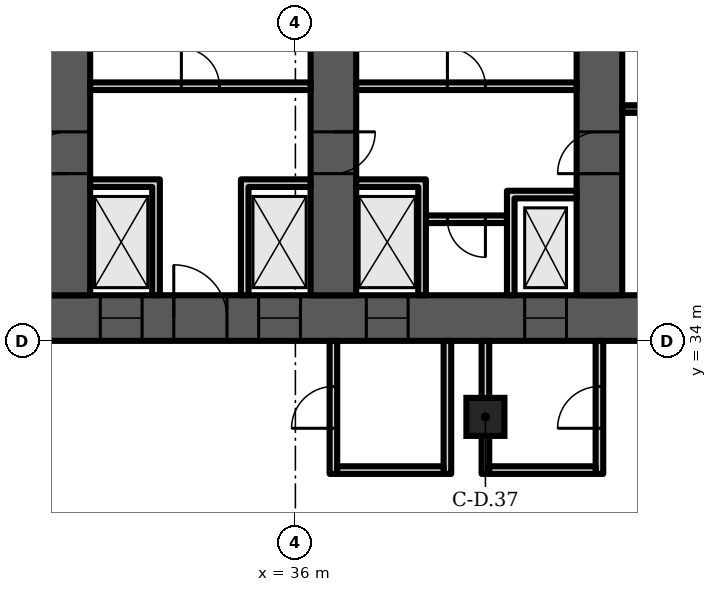
"""IFC4 building model, lengths in metres.
Left out: names, types, materials, properties, quantities, classifications, styles, units other than length and angle.
Written with IfcOpenShell. Run it as: python <this file> out.ifc"""

import sys

from ifc_helpers import new_model, si_unit, direction, frame, frame_2d, origin, origin_2d, place, context, subcontext, project, spatial, polyline, rectangle, outline, extrude, element, fill, save


model = new_model("IFC4")
c1 = context("Model", 3, precision=1e-05, world=origin(), true_north=direction((0.0, 1.0)))
c2 = subcontext(c1, "Body", "Model", "MODEL_VIEW")
j1 = project(units=[si_unit("LENGTHUNIT", "METRE"), si_unit("PLANEANGLEUNIT", "RADIAN")], contexts=[c1])
p1 = place(None, origin())
s1 = spatial("IfcSite", under=j1, at=p1, CompositionType="ELEMENT")
p2 = place(p1, origin())
s2 = spatial("IfcBuilding", under=s1, at=p2, CompositionType="ELEMENT")
p3 = place(p2, frame((0.0, 0.0, 27.5)))
s3 = spatial("IfcBuildingStorey", under=s2, at=p3, CompositionType="ELEMENT", Elevation=27.5)
p4 = place(p3, frame((41.0, 32.0, 0.0), z_axis=(0.0, 0.0, 1.0), x_axis=(1.0, 0.0, 0.0)))
e1 = element("IfcColumn", 1, at=p4, inside=s3, PredefinedType="COLUMN", context=c2, shape_type="SweptSolid", body=[
    extrude(rectangle(XDim=1.0, YDim=1.0, at=origin_2d()), origin(), (0.0, 0.0, 1.0), 5.5),
])
p5 = place(p3, frame((9.0, 34.6, 0.0), z_axis=(0.0, 0.0, 1.0), x_axis=(1.0, 0.0, 0.0)))
e2 = element("IfcWall", 2, at=p5, inside=s3, PredefinedType="SHEAR", context=c2, shape_type="SweptSolid", body=[
    extrude(rectangle(XDim=56.0, YDim=1.2, at=frame_2d((28.0, 0.0))), origin(), (0.0, 0.0, 1.0), 5.2),
])
p6 = place(p5, frame((3.3, 0.0, 0.0)))
e3 = element("IfcOpeningElement", 3, at=p6, cuts=e2, PredefinedType="OPENING", context=c2, shape_type="SweptSolid", body=[
    extrude(rectangle(XDim=1.0, YDim=2.1, at=frame_2d((0.5, 1.05))), frame((0.0, 0.61, 0.0), z_axis=(0.0, -1.0, 0.0), x_axis=(1.0, 0.0, 0.0)), (0.0, 0.0, 1.0), 1.22),
])
p7 = place(p5, frame((7.867, 0.0, 0.0)))
e4 = element("IfcOpeningElement", 4, at=p7, cuts=e2, PredefinedType="OPENING", context=c2, shape_type="SweptSolid", body=[
    extrude(rectangle(XDim=1.1, YDim=2.1, at=frame_2d((0.55, 1.05))), frame((0.0, 0.61, 0.0), z_axis=(0.0, -1.0, 0.0), x_axis=(1.0, 0.0, 0.0)), (0.0, 0.0, 1.0), 1.22),
])
p8 = place(p5, frame((12.033, 0.0, 0.0)))
e5 = element("IfcOpeningElement", 5, at=p8, cuts=e2, PredefinedType="OPENING", context=c2, shape_type="SweptSolid", body=[
    extrude(rectangle(XDim=1.1, YDim=2.1, at=frame_2d((0.55, 1.05))), frame((0.0, 0.61, 0.0), z_axis=(0.0, -1.0, 0.0), x_axis=(1.0, 0.0, 0.0)), (0.0, 0.0, 1.0), 1.22),
])
p9 = place(p5, frame((9.8, 0.0, 0.0)))
e6 = element("IfcOpeningElement", 6, at=p9, cuts=e2, PredefinedType="OPENING", context=c2, shape_type="SweptSolid", body=[
    extrude(rectangle(XDim=1.4, YDim=2.1, at=frame_2d((0.7, 1.05))), frame((0.0, 0.61, 0.0), z_axis=(0.0, -1.0, 0.0), x_axis=(1.0, 0.0, 0.0)), (0.0, 0.0, 1.0), 1.22),
])
p10 = place(p5, frame((14.65, 0.0, 0.0)))
e7 = element("IfcOpeningElement", 7, at=p10, cuts=e2, PredefinedType="OPENING", context=c2, shape_type="SweptSolid", body=[
    extrude(rectangle(XDim=1.2, YDim=2.1, at=frame_2d((0.6, 1.05))), frame((0.0, 0.61, 0.0), z_axis=(0.0, -1.0, 0.0), x_axis=(1.0, 0.0, 0.0)), (0.0, 0.0, 1.0), 1.22),
])
p11 = place(p5, frame((21.867, 0.0, 0.0)))
e8 = element("IfcOpeningElement", 8, at=p11, cuts=e2, PredefinedType="OPENING", context=c2, shape_type="SweptSolid", body=[
    extrude(rectangle(XDim=1.1, YDim=2.1, at=frame_2d((0.55, 1.05))), frame((0.0, 0.61, 0.0), z_axis=(0.0, -1.0, 0.0), x_axis=(1.0, 0.0, 0.0)), (0.0, 0.0, 1.0), 1.22),
])
p12 = place(p5, frame((26.033, 0.0, 0.0)))
e9 = element("IfcOpeningElement", 9, at=p12, cuts=e2, PredefinedType="OPENING", context=c2, shape_type="SweptSolid", body=[
    extrude(rectangle(XDim=1.1, YDim=2.1, at=frame_2d((0.55, 1.05))), frame((0.0, 0.61, 0.0), z_axis=(0.0, -1.0, 0.0), x_axis=(1.0, 0.0, 0.0)), (0.0, 0.0, 1.0), 1.22),
])
p13 = place(p5, frame((23.8, 0.0, 0.0)))
e10 = element("IfcOpeningElement", 10, at=p13, cuts=e2, PredefinedType="OPENING", context=c2, shape_type="SweptSolid", body=[
    extrude(rectangle(XDim=1.4, YDim=2.1, at=frame_2d((0.7, 1.05))), frame((0.0, 0.61, 0.0), z_axis=(0.0, -1.0, 0.0), x_axis=(1.0, 0.0, 0.0)), (0.0, 0.0, 1.0), 1.22),
])
p14 = place(p5, frame((28.867, 0.0, 0.0)))
e11 = element("IfcOpeningElement", 11, at=p14, cuts=e2, PredefinedType="OPENING", context=c2, shape_type="SweptSolid", body=[
    extrude(rectangle(XDim=1.1, YDim=2.1, at=frame_2d((0.55, 1.05))), frame((0.0, 0.61, 0.0), z_axis=(0.0, -1.0, 0.0), x_axis=(1.0, 0.0, 0.0)), (0.0, 0.0, 1.0), 1.22),
])
p15 = place(p5, frame((33.033, 0.0, 0.0)))
e12 = element("IfcOpeningElement", 12, at=p15, cuts=e2, PredefinedType="OPENING", context=c2, shape_type="SweptSolid", body=[
    extrude(rectangle(XDim=1.1, YDim=2.1, at=frame_2d((0.55, 1.05))), frame((0.0, 0.61, 0.0), z_axis=(0.0, -1.0, 0.0), x_axis=(1.0, 0.0, 0.0)), (0.0, 0.0, 1.0), 1.22),
])
p16 = place(p5, frame((40.15, 0.0, 0.0)))
e13 = element("IfcOpeningElement", 13, at=p16, cuts=e2, PredefinedType="OPENING", context=c2, shape_type="SweptSolid", body=[
    extrude(rectangle(XDim=1.2, YDim=2.1, at=frame_2d((0.6, 1.05))), frame((0.0, 0.61, 0.0), z_axis=(0.0, -1.0, 0.0), x_axis=(1.0, 0.0, 0.0)), (0.0, 0.0, 1.0), 1.22),
])
p17 = place(p5, frame((44.8, 0.0, 0.0)))
e14 = element("IfcOpeningElement", 14, at=p17, cuts=e2, PredefinedType="OPENING", context=c2, shape_type="SweptSolid", body=[
    extrude(rectangle(XDim=1.4, YDim=2.1, at=frame_2d((0.7, 1.05))), frame((0.0, 0.61, 0.0), z_axis=(0.0, -1.0, 0.0), x_axis=(1.0, 0.0, 0.0)), (0.0, 0.0, 1.0), 1.22),
])
p18 = place(p5, frame((49.867, 0.0, 0.0)))
e15 = element("IfcOpeningElement", 15, at=p18, cuts=e2, PredefinedType="OPENING", context=c2, shape_type="SweptSolid", body=[
    extrude(rectangle(XDim=1.1, YDim=2.1, at=frame_2d((0.55, 1.05))), frame((0.0, 0.61, 0.0), z_axis=(0.0, -1.0, 0.0), x_axis=(1.0, 0.0, 0.0)), (0.0, 0.0, 1.0), 1.22),
])
p19 = place(p5, frame((53.5, 0.0, 0.0)))
e16 = element("IfcOpeningElement", 16, at=p19, cuts=e2, PredefinedType="OPENING", context=c2, shape_type="SweptSolid", body=[
    extrude(rectangle(XDim=1.1, YDim=2.1, at=frame_2d((0.55, 1.05))), frame((0.0, 0.61, 0.0), z_axis=(0.0, -1.0, 0.0), x_axis=(1.0, 0.0, 0.0)), (0.0, 0.0, 1.0), 1.22),
])
p20 = place(p5, frame((51.567, 0.0, 0.0)))
e17 = element("IfcOpeningElement", 17, at=p20, cuts=e2, PredefinedType="OPENING", context=c2, shape_type="SweptSolid", body=[
    extrude(rectangle(XDim=1.4, YDim=2.1, at=frame_2d((0.7, 1.05))), frame((0.0, 0.61, 0.0), z_axis=(0.0, -1.0, 0.0), x_axis=(1.0, 0.0, 0.0)), (0.0, 0.0, 1.0), 1.22),
])
p21 = place(p3, frame((30.0, 35.2, 0.0), z_axis=(0.0, 0.0, 1.0), x_axis=(0.0, 1.0, 0.0)))
e18 = element("IfcWall", 18, at=p21, inside=s3, PredefinedType="SHEAR", context=c2, shape_type="SweptSolid", body=[
    extrude(rectangle(XDim=12.8, YDim=1.2, at=frame_2d((6.4, 0.0))), origin(), (0.0, 0.0, 1.0), 5.2),
])
p22 = place(p21, frame((3.2, 0.0, 0.0)))
e19 = element("IfcOpeningElement", 19, at=p22, cuts=e18, PredefinedType="OPENING", context=c2, shape_type="SweptSolid", body=[
    extrude(rectangle(XDim=1.1, YDim=2.1, at=frame_2d((0.55, 1.05))), frame((0.0, 0.61, 0.0), z_axis=(0.0, -1.0, 0.0), x_axis=(1.0, 0.0, 0.0)), (0.0, 0.0, 1.0), 1.22),
])
p23 = place(p3, frame((37.0, 35.2, 0.0), z_axis=(0.0, 0.0, 1.0), x_axis=(0.0, 1.0, 0.0)))
e20 = element("IfcWall", 20, at=p23, inside=s3, PredefinedType="SHEAR", context=c2, shape_type="SweptSolid", body=[
    extrude(rectangle(XDim=12.8, YDim=1.2, at=frame_2d((6.4, 0.0))), origin(), (0.0, 0.0, 1.0), 5.2),
])
p24 = place(p23, frame((3.2, 0.0, 0.0)))
e21 = element("IfcOpeningElement", 21, at=p24, cuts=e20, PredefinedType="OPENING", context=c2, shape_type="SweptSolid", body=[
    extrude(rectangle(XDim=1.1, YDim=2.1, at=frame_2d((0.55, 1.05))), frame((0.0, 0.61, 0.0), z_axis=(0.0, -1.0, 0.0), x_axis=(1.0, 0.0, 0.0)), (0.0, 0.0, 1.0), 1.22),
])
p25 = place(p23, frame((9.6, 0.0, 0.0)))
e22 = element("IfcOpeningElement", 22, at=p25, cuts=e20, PredefinedType="OPENING", context=c2, shape_type="SweptSolid", body=[
    extrude(rectangle(XDim=1.0, YDim=2.1, at=frame_2d((0.5, 1.05))), frame((0.0, 0.61, 0.0), z_axis=(0.0, -1.0, 0.0), x_axis=(1.0, 0.0, 0.0)), (0.0, 0.0, 1.0), 1.22),
])
p26 = place(p3, frame((44.0, 35.2, 0.0), z_axis=(0.0, 0.0, 1.0), x_axis=(0.0, 1.0, 0.0)))
e23 = element("IfcWall", 23, at=p26, inside=s3, PredefinedType="SHEAR", context=c2, shape_type="SweptSolid", body=[
    extrude(rectangle(XDim=12.8, YDim=1.2, at=frame_2d((6.4, 0.0))), origin(), (0.0, 0.0, 1.0), 5.2),
])
p27 = place(p26, frame((3.2, 0.0, 0.0)))
e24 = element("IfcOpeningElement", 24, at=p27, cuts=e23, PredefinedType="OPENING", context=c2, shape_type="SweptSolid", body=[
    extrude(rectangle(XDim=1.1, YDim=2.1, at=frame_2d((0.55, 1.05))), frame((0.0, 0.61, 0.0), z_axis=(0.0, -1.0, 0.0), x_axis=(1.0, 0.0, 0.0)), (0.0, 0.0, 1.0), 1.22),
])
p28 = place(p26, frame((9.6, 0.0, 0.0)))
e25 = element("IfcOpeningElement", 25, at=p28, cuts=e23, PredefinedType="OPENING", context=c2, shape_type="SweptSolid", body=[
    extrude(rectangle(XDim=1.0, YDim=2.1, at=frame_2d((0.5, 1.05))), frame((0.0, 0.61, 0.0), z_axis=(0.0, -1.0, 0.0), x_axis=(1.0, 0.0, 0.0)), (0.0, 0.0, 1.0), 1.22),
])
p29 = place(p3, frame((30.6, 40.7, 0.0), z_axis=(0.0, 0.0, 1.0), x_axis=(1.0, 0.0, 0.0)))
e26 = element("IfcWall", 26, at=p29, inside=s3, PredefinedType="PARTITIONING", context=c2, shape_type="SweptSolid", body=[
    extrude(rectangle(XDim=5.8, YDim=0.2, at=frame_2d((2.9, 0.0))), origin(), (0.0, 0.0, 1.0), 5.2),
])
p30 = place(p29, frame((2.4, 0.0, 0.0)))
e27 = element("IfcOpeningElement", 27, at=p30, cuts=e26, PredefinedType="OPENING", context=c2, shape_type="SweptSolid", body=[
    extrude(rectangle(XDim=1.0, YDim=2.1, at=frame_2d((0.5, 1.05))), frame((0.0, 0.11, 0.0), z_axis=(0.0, -1.0, 0.0), x_axis=(1.0, 0.0, 0.0)), (0.0, 0.0, 1.0), 0.22),
])
p31 = place(p3, frame((0.0, 0.0, -0.0)))
e28 = element("IfcWall", 28, at=p31, inside=s3, PredefinedType="PARTITIONING", context=c2, shape_type="SweptSolid", body=[
    extrude(outline(polyline([(32.233, 38.05), (30.6, 38.05), (30.6, 38.25), (32.233, 38.25), (32.433, 38.25), (32.433, 35.2), (32.233, 35.2), (32.233, 38.05)])), origin(), (0.0, 0.0, 1.0), 5.2),
])
p32 = place(p3, frame((0.0, 0.0, -0.0)))
e29 = element("IfcWall", 29, at=p32, inside=s3, PredefinedType="PARTITIONING", context=c2, shape_type="SweptSolid", body=[
    extrude(outline(polyline([(34.567, 38.25), (34.767, 38.25), (36.4, 38.25), (36.4, 38.05), (34.767, 38.05), (34.767, 35.2), (34.567, 35.2), (34.567, 38.25)])), origin(), (0.0, 0.0, 1.0), 5.2),
])
p33 = place(p3, frame((39.433, 37.2, 0.0), z_axis=(0.0, 0.0, 1.0), x_axis=(1.0, 0.0, 0.0)))
e30 = element("IfcWall", 30, at=p33, inside=s3, PredefinedType="PARTITIONING", context=c2, shape_type="SweptSolid", body=[
    extrude(rectangle(XDim=2.133, YDim=0.2, at=frame_2d((1.067, 0.0))), origin(), (0.0, 0.0, 1.0), 5.2),
])
p34 = place(p33, frame((0.567, 0.0, 0.0)))
e31 = element("IfcOpeningElement", 31, at=p34, cuts=e30, PredefinedType="OPENING", context=c2, shape_type="SweptSolid", body=[
    extrude(rectangle(XDim=1.0, YDim=2.1, at=frame_2d((0.5, 1.05))), frame((0.0, 0.11, 0.0), z_axis=(0.0, -1.0, 0.0), x_axis=(1.0, 0.0, 0.0)), (0.0, 0.0, 1.0), 0.22),
])
p35 = place(p3, frame((37.6, 40.7, 0.0), z_axis=(0.0, 0.0, 1.0), x_axis=(1.0, 0.0, 0.0)))
e32 = element("IfcWall", 32, at=p35, inside=s3, PredefinedType="PARTITIONING", context=c2, shape_type="SweptSolid", body=[
    extrude(rectangle(XDim=5.8, YDim=0.2, at=frame_2d((2.9, 0.0))), origin(), (0.0, 0.0, 1.0), 5.2),
])
p36 = place(p35, frame((2.4, 0.0, 0.0)))
e33 = element("IfcOpeningElement", 33, at=p36, cuts=e32, PredefinedType="OPENING", context=c2, shape_type="SweptSolid", body=[
    extrude(rectangle(XDim=1.0, YDim=2.1, at=frame_2d((0.5, 1.05))), frame((0.0, 0.11, 0.0), z_axis=(0.0, -1.0, 0.0), x_axis=(1.0, 0.0, 0.0)), (0.0, 0.0, 1.0), 0.22),
])
p37 = place(p3, frame((0.0, 0.0, -0.0)))
e34 = element("IfcWall", 34, at=p37, inside=s3, PredefinedType="PARTITIONING", context=c2, shape_type="SweptSolid", body=[
    extrude(outline(polyline([(41.567, 37.95), (41.767, 37.95), (43.4, 37.95), (43.4, 37.75), (41.767, 37.75), (41.767, 35.2), (41.567, 35.2), (41.567, 37.95)])), origin(), (0.0, 0.0, 1.0), 5.2),
])
p38 = place(p3, frame((0.0, 0.0, -0.0)))
e35 = element("IfcWall", 35, at=p38, inside=s3, PredefinedType="PARTITIONING", context=c2, shape_type="SweptSolid", body=[
    extrude(outline(polyline([(39.233, 38.05), (37.6, 38.05), (37.6, 38.25), (39.233, 38.25), (39.433, 38.25), (39.433, 35.2), (39.233, 35.2), (39.233, 38.05)])), origin(), (0.0, 0.0, 1.0), 5.2),
])
p39 = place(p3, frame((44.6, 40.1, 0.0), z_axis=(0.0, 0.0, 1.0), x_axis=(1.0, 0.0, 0.0)))
e36 = element("IfcWall", 36, at=p39, inside=s3, PredefinedType="SHEAR", context=c2, shape_type="SweptSolid", body=[
    extrude(rectangle(XDim=5.8, YDim=0.2, at=frame_2d((2.9, 0.0))), origin(), (0.0, 0.0, 1.0), 5.2),
])
p40 = place(p39, frame((3.325, 0.0, 0.0)))
e37 = element("IfcOpeningElement", 37, at=p40, cuts=e36, PredefinedType="OPENING", context=c2, shape_type="SweptSolid", body=[
    extrude(rectangle(XDim=1.2, YDim=2.1, at=frame_2d((0.6, 1.05))), frame((0.0, 0.11, 0.0), z_axis=(0.0, -1.0, 0.0), x_axis=(1.0, 0.0, 0.0)), (0.0, 0.0, 1.0), 0.22),
])
p41 = place(p39, frame((0.475, 0.0, 0.0)))
e38 = element("IfcOpeningElement", 38, at=p41, cuts=e36, PredefinedType="OPENING", context=c2, shape_type="SweptSolid", body=[
    extrude(rectangle(XDim=0.9, YDim=2.1, at=frame_2d((0.45, 1.05))), frame((0.0, 0.11, 0.0), z_axis=(0.0, -1.0, 0.0), x_axis=(1.0, 0.0, 0.0)), (0.0, 0.0, 1.0), 0.22),
])
p42 = place(p3, frame((37.0, 30.5, 0.0), z_axis=(0.0, 0.0, 1.0), x_axis=(0.0, 1.0, 0.0)))
e39 = element("IfcWall", 39, at=p42, inside=s3, PredefinedType="PARTITIONING", context=c2, shape_type="SweptSolid", body=[
    extrude(rectangle(XDim=3.5, YDim=0.2, at=frame_2d((1.75, 0.0))), origin(), (0.0, 0.0, 1.0), 5.2),
])
p43 = place(p42, frame((1.2, 0.0, 0.0)))
e40 = element("IfcOpeningElement", 40, at=p43, cuts=e39, PredefinedType="OPENING", context=c2, shape_type="SweptSolid", body=[
    extrude(rectangle(XDim=1.1, YDim=2.1, at=frame_2d((0.55, 1.05))), frame((0.0, 0.11, 0.0), z_axis=(0.0, -1.0, 0.0), x_axis=(1.0, 0.0, 0.0)), (0.0, 0.0, 1.0), 0.22),
])
p44 = place(p3, frame((40.0, 30.5, 0.0), z_axis=(0.0, 0.0, 1.0), x_axis=(0.0, 1.0, 0.0)))
e41 = element("IfcWall", 41, at=p44, inside=s3, PredefinedType="PARTITIONING", context=c2, shape_type="SweptSolid", body=[
    extrude(rectangle(XDim=3.5, YDim=0.2, at=frame_2d((1.75, 0.0))), origin(), (0.0, 0.0, 1.0), 5.2),
])
p45 = place(p3, frame((37.1, 30.6, 0.0), z_axis=(0.0, 0.0, 1.0), x_axis=(1.0, 0.0, 0.0)))
e42 = element("IfcWall", 42, at=p45, inside=s3, PredefinedType="PARTITIONING", context=c2, shape_type="SweptSolid", body=[
    extrude(rectangle(XDim=2.8, YDim=0.2, at=frame_2d((1.4, 0.0))), origin(), (0.0, 0.0, 1.0), 5.2),
])
p46 = place(p3, frame((41.0, 30.5, 0.0), z_axis=(0.0, 0.0, 1.0), x_axis=(0.0, 1.0, 0.0)))
e43 = element("IfcWall", 43, at=p46, inside=s3, PredefinedType="PARTITIONING", context=c2, shape_type="SweptSolid", body=[
    extrude(rectangle(XDim=3.5, YDim=0.2, at=frame_2d((1.75, 0.0))), origin(), (0.0, 0.0, 1.0), 5.2),
])
p47 = place(p3, frame((44.0, 30.5, 0.0), z_axis=(0.0, 0.0, 1.0), x_axis=(0.0, 1.0, 0.0)))
e44 = element("IfcWall", 44, at=p47, inside=s3, PredefinedType="PARTITIONING", context=c2, shape_type="SweptSolid", body=[
    extrude(rectangle(XDim=3.5, YDim=0.2, at=frame_2d((1.75, 0.0))), origin(), (0.0, 0.0, 1.0), 5.2),
])
p48 = place(p47, frame((1.2, 0.0, 0.0)))
e45 = element("IfcOpeningElement", 45, at=p48, cuts=e44, PredefinedType="OPENING", context=c2, shape_type="SweptSolid", body=[
    extrude(rectangle(XDim=1.1, YDim=2.1, at=frame_2d((0.55, 1.05))), frame((0.0, 0.11, 0.0), z_axis=(0.0, -1.0, 0.0), x_axis=(1.0, 0.0, 0.0)), (0.0, 0.0, 1.0), 0.22),
])
p49 = place(p3, frame((41.1, 30.6, 0.0), z_axis=(0.0, 0.0, 1.0), x_axis=(1.0, 0.0, 0.0)))
e46 = element("IfcWall", 46, at=p49, inside=s3, PredefinedType="PARTITIONING", context=c2, shape_type="SweptSolid", body=[
    extrude(rectangle(XDim=2.8, YDim=0.2, at=frame_2d((1.4, 0.0))), origin(), (0.0, 0.0, 1.0), 5.2),
])
p50 = place(p11, origin())
e47 = element("IfcDoor", 47, at=p50, inside=s3, OperationType="DOUBLE_DOOR_SLIDING", PredefinedType="DOOR", context=c2, shape_type="SweptSolid", body=[
    extrude(rectangle(XDim=1.1, YDim=2.1, at=frame_2d((0.55, 1.05))), frame((0.0, 0.025, 0.0), z_axis=(0.0, -1.0, 0.0), x_axis=(1.0, 0.0, 0.0)), (0.0, 0.0, 1.0), 0.05),
])
fill(e8, e47)
p51 = place(p12, origin())
e48 = element("IfcDoor", 48, at=p51, inside=s3, OperationType="DOUBLE_DOOR_SLIDING", PredefinedType="DOOR", context=c2, shape_type="SweptSolid", body=[
    extrude(rectangle(XDim=1.1, YDim=2.1, at=frame_2d((0.55, 1.05))), frame((0.0, 0.025, 0.0), z_axis=(0.0, -1.0, 0.0), x_axis=(1.0, 0.0, 0.0)), (0.0, 0.0, 1.0), 0.05),
])
fill(e9, e48)
p52 = place(p13, origin())
e49 = element("IfcDoor", 49, at=p52, inside=s3, OperationType="DOUBLE_DOOR_SINGLE_SWING", PredefinedType="DOOR", context=c2, shape_type="SweptSolid", body=[
    extrude(rectangle(XDim=1.4, YDim=2.1, at=frame_2d((0.7, 1.05))), frame((0.0, 0.025, 0.0), z_axis=(0.0, -1.0, 0.0), x_axis=(1.0, 0.0, 0.0)), (0.0, 0.0, 1.0), 0.05),
])
fill(e10, e49)
p53 = place(p30, origin())
e50 = element("IfcDoor", 50, at=p53, inside=s3, OperationType="SINGLE_SWING_LEFT", PredefinedType="DOOR", context=c2, shape_type="SweptSolid", body=[
    extrude(rectangle(XDim=1.0, YDim=2.1, at=frame_2d((0.5, 1.05))), frame((0.0, 0.025, 0.0), z_axis=(0.0, -1.0, 0.0), x_axis=(1.0, 0.0, 0.0)), (0.0, 0.0, 1.0), 0.05),
])
fill(e27, e50)
p54 = place(p34, origin())
e51 = element("IfcDoor", 51, at=p54, inside=s3, OperationType="SINGLE_SWING_RIGHT", PredefinedType="DOOR", context=c2, shape_type="SweptSolid", body=[
    extrude(rectangle(XDim=1.0, YDim=2.1, at=frame_2d((0.5, 1.05))), frame((0.0, 0.025, 0.0), z_axis=(0.0, -1.0, 0.0), x_axis=(1.0, 0.0, 0.0)), (0.0, 0.0, 1.0), 0.05),
])
fill(e31, e51)
p55 = place(p14, origin())
e52 = element("IfcDoor", 52, at=p55, inside=s3, OperationType="DOUBLE_DOOR_SLIDING", PredefinedType="DOOR", context=c2, shape_type="SweptSolid", body=[
    extrude(rectangle(XDim=1.1, YDim=2.1, at=frame_2d((0.55, 1.05))), frame((0.0, 0.025, 0.0), z_axis=(0.0, -1.0, 0.0), x_axis=(1.0, 0.0, 0.0)), (0.0, 0.0, 1.0), 0.05),
])
fill(e11, e52)
p56 = place(p15, origin())
e53 = element("IfcDoor", 53, at=p56, inside=s3, OperationType="DOUBLE_DOOR_SLIDING", PredefinedType="DOOR", context=c2, shape_type="SweptSolid", body=[
    extrude(rectangle(XDim=1.1, YDim=2.1, at=frame_2d((0.55, 1.05))), frame((0.0, 0.025, 0.0), z_axis=(0.0, -1.0, 0.0), x_axis=(1.0, 0.0, 0.0)), (0.0, 0.0, 1.0), 0.05),
])
fill(e12, e53)
p57 = place(p36, origin())
e54 = element("IfcDoor", 54, at=p57, inside=s3, OperationType="SINGLE_SWING_LEFT", PredefinedType="DOOR", context=c2, shape_type="SweptSolid", body=[
    extrude(rectangle(XDim=1.0, YDim=2.1, at=frame_2d((0.5, 1.05))), frame((0.0, 0.025, 0.0), z_axis=(0.0, -1.0, 0.0), x_axis=(1.0, 0.0, 0.0)), (0.0, 0.0, 1.0), 0.05),
])
fill(e33, e54)
p58 = place(p22, origin())
e55 = element("IfcDoor", 55, at=p58, inside=s3, OperationType="SINGLE_SWING_LEFT", PredefinedType="DOOR", context=c2, shape_type="SweptSolid", body=[
    extrude(rectangle(XDim=1.1, YDim=2.1, at=frame_2d((0.55, 1.05))), frame((0.0, 0.025, 0.0), z_axis=(0.0, -1.0, 0.0), x_axis=(1.0, 0.0, 0.0)), (0.0, 0.0, 1.0), 0.05),
])
fill(e19, e55)
p59 = place(p24, origin())
e56 = element("IfcDoor", 56, at=p59, inside=s3, OperationType="SINGLE_SWING_RIGHT", PredefinedType="DOOR", context=c2, shape_type="SweptSolid", body=[
    extrude(rectangle(XDim=1.1, YDim=2.1, at=frame_2d((0.55, 1.05))), frame((0.0, 0.025, 0.0), z_axis=(0.0, -1.0, 0.0), x_axis=(1.0, 0.0, 0.0)), (0.0, 0.0, 1.0), 0.05),
])
fill(e21, e56)
p60 = place(p27, origin())
e57 = element("IfcDoor", 57, at=p60, inside=s3, OperationType="SINGLE_SWING_LEFT", PredefinedType="DOOR", context=c2, shape_type="SweptSolid", body=[
    extrude(rectangle(XDim=1.1, YDim=2.1, at=frame_2d((0.55, 1.05))), frame((0.0, 0.025, 0.0), z_axis=(0.0, -1.0, 0.0), x_axis=(1.0, 0.0, 0.0)), (0.0, 0.0, 1.0), 0.05),
])
fill(e24, e57)
p61 = place(p43, origin())
e58 = element("IfcDoor", 58, at=p61, inside=s3, OperationType="SINGLE_SWING_LEFT", PredefinedType="DOOR", context=c2, shape_type="SweptSolid", body=[
    extrude(rectangle(XDim=1.1, YDim=2.1, at=frame_2d((0.55, 1.05))), frame((0.0, 0.025, 0.0), z_axis=(0.0, -1.0, 0.0), x_axis=(1.0, 0.0, 0.0)), (0.0, 0.0, 1.0), 0.05),
])
fill(e40, e58)
p62 = place(p48, origin())
e59 = element("IfcDoor", 59, at=p62, inside=s3, OperationType="SINGLE_SWING_LEFT", PredefinedType="DOOR", context=c2, shape_type="SweptSolid", body=[
    extrude(rectangle(XDim=1.1, YDim=2.1, at=frame_2d((0.55, 1.05))), frame((0.0, 0.025, 0.0), z_axis=(0.0, -1.0, 0.0), x_axis=(1.0, 0.0, 0.0)), (0.0, 0.0, 1.0), 0.05),
])
fill(e45, e59)
save(model, sys.argv[1])
